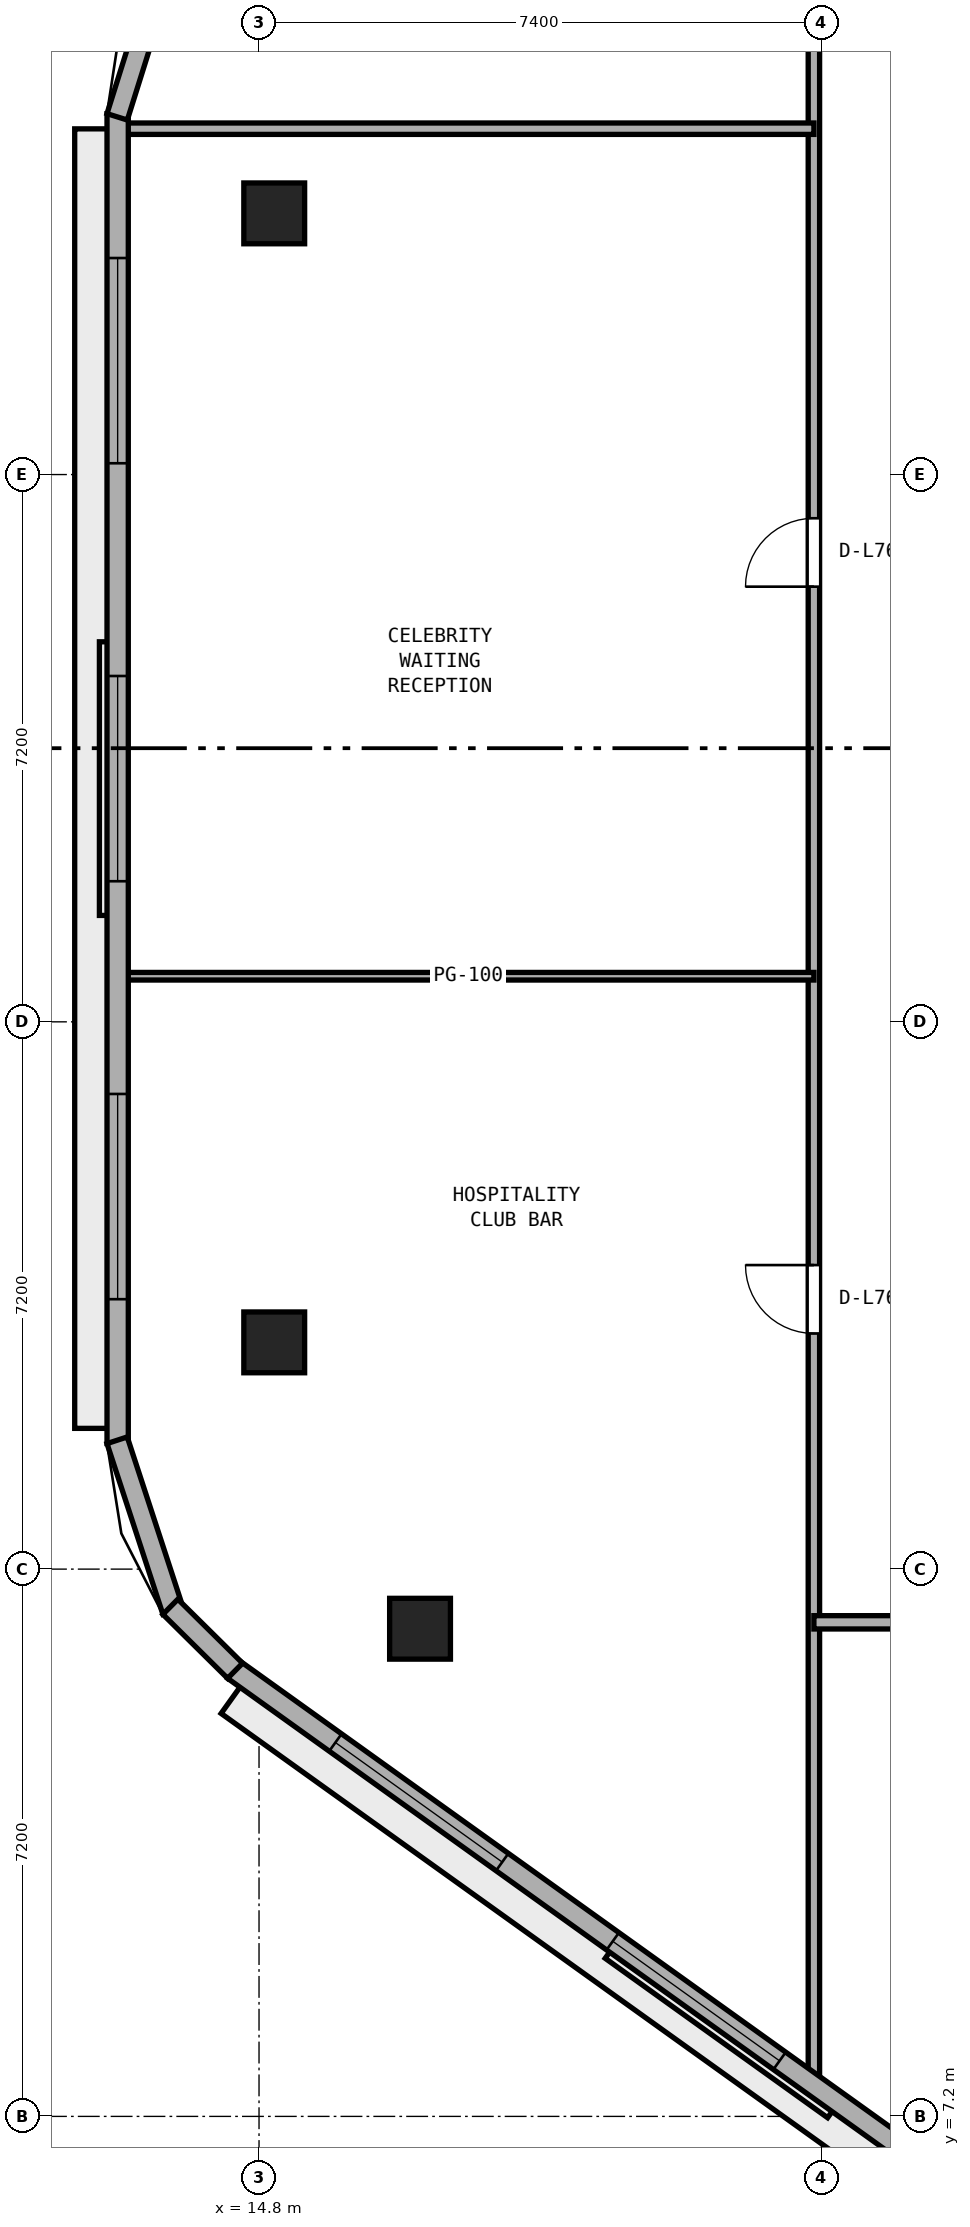
"""IFC4 building model, lengths in metres.
Left out: names, types, materials, properties, quantities, classifications, styles, units other than length and angle.
Written with IfcOpenShell. Run it as: python <this file> out.ifc"""

import sys

from ifc_helpers import new_model, si_unit, direction, frame, frame_2d, origin, origin_2d, place, context, subcontext, project, spatial, rectangle, extrude, element, fill, save


model = new_model("IFC4")
c1 = context("Model", 3, precision=1e-05, world=origin(), true_north=direction((0.0, 1.0)))
c2 = subcontext(c1, "Body", "Model", "MODEL_VIEW")
j1 = project(units=[si_unit("LENGTHUNIT", "METRE"), si_unit("PLANEANGLEUNIT", "RADIAN")], contexts=[c1])
p1 = place(None, origin())
s1 = spatial("IfcSite", under=j1, at=p1, CompositionType="ELEMENT")
p2 = place(p1, origin())
s2 = spatial("IfcBuilding", under=s1, at=p2, CompositionType="ELEMENT")
p3 = place(p2, frame((0.0, 0.0, 297.2)))
s3 = spatial("IfcBuildingStorey", under=s2, at=p3, CompositionType="ELEMENT", Elevation=297.2)
for number, where, z_axis, x_axis in (
    (1, (15.0, 32.236, 0.0), (0.0, 0.0, 1.0), (1.0, 0.0, 0.0)),
    (2, (15.0, 17.383, 0.0), (0.0, 0.0, 1.0), (1.0, 0.0, 0.0)),
    (3, (16.918, 13.616, 0.0), (0.0, 0.0, 1.0), (1.0, 0.0, 0.0)),
):
    element("IfcColumn", number, at=place(p3, frame(where, z_axis=z_axis, x_axis=x_axis)), inside=s3, PredefinedType="COLUMN", context=c2, shape_type="SweptSolid", body=[
        extrude(rectangle(XDim=0.8, YDim=0.8, at=origin_2d()), origin(), (0.0, 0.0, 1.0), 3.8),
    ])
p4 = place(p3, frame((22.1, 7.575, 0.0), z_axis=(0.0, 0.0, 1.0), x_axis=(0.0, 1.0, 0.0)))
e4 = element("IfcWall", 4, at=p4, inside=s3, PredefinedType="PARTITIONING", context=c2, shape_type="SweptSolid", body=[
    extrude(rectangle(XDim=29.125, YDim=0.15, at=frame_2d((14.562, 0.0))), origin(), (0.0, 0.0, 1.0), 3.54),
])
p5 = place(p4, frame((9.925, 0.0, 0.0)))
e5 = element("IfcOpeningElement", 5, at=p5, cuts=e4, PredefinedType="OPENING", context=c2, shape_type="SweptSolid", body=[
    extrude(rectangle(XDim=0.9, YDim=2.1, at=frame_2d((0.45, 1.05))), frame((0.0, 0.085, 0.0), z_axis=(0.0, -1.0, 0.0), x_axis=(1.0, 0.0, 0.0)), (0.0, 0.0, 1.0), 0.17),
])
p6 = place(p4, frame((19.75, 0.0, 0.0)))
e6 = element("IfcOpeningElement", 6, at=p6, cuts=e4, PredefinedType="OPENING", context=c2, shape_type="SweptSolid", body=[
    extrude(rectangle(XDim=0.9, YDim=2.1, at=frame_2d((0.45, 1.05))), frame((0.0, 0.085, 0.0), z_axis=(0.0, -1.0, 0.0), x_axis=(1.0, 0.0, 0.0)), (0.0, 0.0, 1.0), 0.17),
])
p7 = place(p3, frame((22.1, 13.7, 0.0), z_axis=(0.0, 0.0, 1.0), x_axis=(1.0, 0.0, 0.0)))
e7 = element("IfcWall", 7, at=p7, inside=s3, PredefinedType="PARTITIONING", context=c2, shape_type="SweptSolid", body=[
    extrude(rectangle(XDim=26.5, YDim=0.175, at=frame_2d((13.25, 0.0))), origin(), (0.0, 0.0, 1.0), 3.54),
])
p8 = place(p7, frame((7.12, 0.0, 0.0)))
e8 = element("IfcOpeningElement", 8, at=p8, cuts=e7, PredefinedType="OPENING", context=c2, shape_type="SweptSolid", body=[
    extrude(rectangle(XDim=0.9, YDim=2.1, at=frame_2d((0.45, 1.05))), frame((0.0, 0.097, 0.0), z_axis=(0.0, -1.0, 0.0), x_axis=(1.0, 0.0, 0.0)), (0.0, 0.0, 1.0), 0.195),
])
p9 = place(p7, frame((20.13, 0.0, 0.0)))
e9 = element("IfcOpeningElement", 9, at=p9, cuts=e7, PredefinedType="OPENING", context=c2, shape_type="SweptSolid", body=[
    extrude(rectangle(XDim=0.9, YDim=2.1, at=frame_2d((0.45, 1.05))), frame((0.0, 0.097, 0.0), z_axis=(0.0, -1.0, 0.0), x_axis=(1.0, 0.0, 0.0)), (0.0, 0.0, 1.0), 0.195),
])
p10 = place(p3, frame((13.005, 22.2, 0.0), z_axis=(0.0, 0.0, 1.0), x_axis=(1.0, 0.0, 0.0)))
e10 = element("IfcWall", 10, at=p10, inside=s3, PredefinedType="PARTITIONING", context=c2, shape_type="SweptSolid", body=[
    extrude(rectangle(XDim=9.095, YDim=0.1, at=frame_2d((4.548, 0.0))), origin(), (0.0, 0.0, 1.0), 3.54),
])
p11 = place(p3, frame((13.005, 33.35, 0.0), z_axis=(0.0, 0.0, 1.0), x_axis=(1.0, 0.0, 0.0)))
e11 = element("IfcWall", 11, at=p11, inside=s3, PredefinedType="PARTITIONING", context=c2, shape_type="SweptSolid", body=[
    extrude(rectangle(XDim=9.095, YDim=0.15, at=frame_2d((4.548, 0.0))), origin(), (0.0, 0.0, 1.0), 3.54),
])
p12 = place(p3, frame((12.94, 33.548, 0.0), z_axis=(0.0, 0.0, 1.0), x_axis=(0.0, -1.0, 0.0)))
e12 = element("IfcWall", 12, at=p12, inside=s3, PredefinedType="STANDARD", context=c2, shape_type="SweptSolid", body=[
    extrude(rectangle(XDim=17.496, YDim=0.28, at=frame_2d((8.748, 0.0))), origin(), (0.0, 0.0, 1.0), 3.54),
])
p13 = place(p12, frame((1.899, 0.0, 0.9)))
e13 = element("IfcOpeningElement", 13, at=p13, cuts=e12, PredefinedType="OPENING", context=c2, shape_type="SweptSolid", body=[
    extrude(rectangle(XDim=2.7, YDim=1.75, at=frame_2d((1.35, 0.875))), frame((0.0, 0.15, 0.0), z_axis=(0.0, -1.0, 0.0), x_axis=(1.0, 0.0, 0.0)), (0.0, 0.0, 1.0), 0.3),
])
p14 = place(p12, frame((7.398, 0.0, 0.9)))
e14 = element("IfcOpeningElement", 14, at=p14, cuts=e12, PredefinedType="OPENING", context=c2, shape_type="SweptSolid", body=[
    extrude(rectangle(XDim=2.7, YDim=1.75, at=frame_2d((1.35, 0.875))), frame((0.0, 0.15, 0.0), z_axis=(0.0, -1.0, 0.0), x_axis=(1.0, 0.0, 0.0)), (0.0, 0.0, 1.0), 0.3),
])
p15 = place(p12, frame((12.897, 0.0, 0.9)))
e15 = element("IfcOpeningElement", 15, at=p15, cuts=e12, PredefinedType="OPENING", context=c2, shape_type="SweptSolid", body=[
    extrude(rectangle(XDim=2.7, YDim=1.75, at=frame_2d((1.35, 0.875))), frame((0.0, 0.15, 0.0), z_axis=(0.0, -1.0, 0.0), x_axis=(1.0, 0.0, 0.0)), (0.0, 0.0, 1.0), 0.3),
])
p16 = place(p3, frame((14.468, 13.077, 0.0), z_axis=(0.0, 0.0, 1.0), x_axis=(0.812809888039, -0.582529042972, 0.0)))
e16 = element("IfcWall", 16, at=p16, inside=s3, PredefinedType="STANDARD", context=c2, shape_type="SweptSolid", body=[
    extrude(rectangle(XDim=15.968, YDim=0.28, at=frame_2d((7.984, 0.0))), origin(), (0.0, 0.0, 1.0), 3.54),
])
p17 = place(p16, frame((1.645, 0.0, 0.9)))
e17 = element("IfcOpeningElement", 17, at=p17, cuts=e16, PredefinedType="OPENING", context=c2, shape_type="SweptSolid", body=[
    extrude(rectangle(XDim=2.7, YDim=1.75, at=frame_2d((1.35, 0.875))), frame((0.0, 0.15, 0.0), z_axis=(0.0, -1.0, 0.0), x_axis=(1.0, 0.0, 0.0)), (0.0, 0.0, 1.0), 0.3),
])
p18 = place(p16, frame((6.134, 0.0, 0.9)))
e18 = element("IfcOpeningElement", 18, at=p18, cuts=e16, PredefinedType="OPENING", context=c2, shape_type="SweptSolid", body=[
    extrude(rectangle(XDim=2.7, YDim=1.75, at=frame_2d((1.35, 0.875))), frame((0.0, 0.15, 0.0), z_axis=(0.0, -1.0, 0.0), x_axis=(1.0, 0.0, 0.0)), (0.0, 0.0, 1.0), 0.3),
])
p19 = place(p16, frame((11.623, 0.0, 0.9)))
e19 = element("IfcOpeningElement", 19, at=p19, cuts=e16, PredefinedType="OPENING", context=c2, shape_type="SweptSolid", body=[
    extrude(rectangle(XDim=2.7, YDim=1.75, at=frame_2d((1.35, 0.875))), frame((0.0, 0.15, 0.0), z_axis=(0.0, -1.0, 0.0), x_axis=(1.0, 0.0, 0.0)), (0.0, 0.0, 1.0), 0.3),
])
p20 = place(p3, frame((13.615, 35.677, 0.0), z_axis=(0.0, 0.0, 1.0), x_axis=(-0.299374552426, -0.954135670311, 0.0)))
e20 = element("IfcWall", 20, at=p20, inside=s3, PredefinedType="STANDARD", context=c2, shape_type="SweptSolid", body=[
    extrude(rectangle(XDim=2.275, YDim=0.28, at=frame_2d((1.138, 0.0))), origin(), (0.0, 0.0, 1.0), 3.54),
])
p21 = place(p3, frame((12.933, 16.095, 0.0), z_axis=(0.0, 0.0, 1.0), x_axis=(0.3110492363, -0.950393798695, 0.0)))
e21 = element("IfcWall", 21, at=p21, inside=s3, PredefinedType="STANDARD", context=c2, shape_type="SweptSolid", body=[
    extrude(rectangle(XDim=2.364, YDim=0.28, at=frame_2d((1.182, 0.0))), origin(), (0.0, 0.0, 1.0), 3.54),
])
p22 = place(p3, frame((13.634, 13.904, 0.0), z_axis=(0.0, 0.0, 1.0), x_axis=(0.710971221429, -0.703221104845, 0.0)))
e22 = element("IfcWall", 22, at=p22, inside=s3, PredefinedType="STANDARD", context=c2, shape_type="SweptSolid", body=[
    extrude(rectangle(XDim=1.197, YDim=0.28, at=frame_2d((0.599, 0.0))), origin(), (0.0, 0.0, 1.0), 3.54),
])
p23 = place(p5, origin())
e23 = element("IfcDoor", 23, at=p23, inside=s3, OperationType="SINGLE_SWING_RIGHT", PredefinedType="DOOR", context=c2, shape_type="SweptSolid", body=[
    extrude(rectangle(XDim=0.9, YDim=2.1, at=frame_2d((0.45, 1.05))), frame((0.0, 0.025, 0.0), z_axis=(0.0, -1.0, 0.0), x_axis=(1.0, 0.0, 0.0)), (0.0, 0.0, 1.0), 0.05),
])
fill(e5, e23)
p24 = place(p6, origin())
e24 = element("IfcDoor", 24, at=p24, inside=s3, OperationType="SINGLE_SWING_LEFT", PredefinedType="DOOR", context=c2, shape_type="SweptSolid", body=[
    extrude(rectangle(XDim=0.9, YDim=2.1, at=frame_2d((0.45, 1.05))), frame((0.0, 0.025, 0.0), z_axis=(0.0, -1.0, 0.0), x_axis=(1.0, 0.0, 0.0)), (0.0, 0.0, 1.0), 0.05),
])
fill(e6, e24)
p25 = place(p13, origin())
e25 = element("IfcWindow", 25, at=p25, inside=s3, PartitioningType="SINGLE_PANEL", PredefinedType="WINDOW", context=c2, shape_type="SweptSolid", body=[
    extrude(rectangle(XDim=2.7, YDim=1.75, at=frame_2d((1.35, 0.875))), frame((0.0, 0.03, 0.0), z_axis=(0.0, -1.0, 0.0), x_axis=(1.0, 0.0, 0.0)), (0.0, 0.0, 1.0), 0.06),
])
fill(e13, e25)
p26 = place(p14, origin())
e26 = element("IfcWindow", 26, at=p26, inside=s3, PartitioningType="SINGLE_PANEL", PredefinedType="WINDOW", context=c2, shape_type="SweptSolid", body=[
    extrude(rectangle(XDim=2.7, YDim=1.75, at=frame_2d((1.35, 0.875))), frame((0.0, 0.03, 0.0), z_axis=(0.0, -1.0, 0.0), x_axis=(1.0, 0.0, 0.0)), (0.0, 0.0, 1.0), 0.06),
])
fill(e14, e26)
p27 = place(p15, origin())
e27 = element("IfcWindow", 27, at=p27, inside=s3, PartitioningType="SINGLE_PANEL", PredefinedType="WINDOW", context=c2, shape_type="SweptSolid", body=[
    extrude(rectangle(XDim=2.7, YDim=1.75, at=frame_2d((1.35, 0.875))), frame((0.0, 0.03, 0.0), z_axis=(0.0, -1.0, 0.0), x_axis=(1.0, 0.0, 0.0)), (0.0, 0.0, 1.0), 0.06),
])
fill(e15, e27)
p28 = place(p17, origin())
e28 = element("IfcWindow", 28, at=p28, inside=s3, PartitioningType="SINGLE_PANEL", PredefinedType="WINDOW", context=c2, shape_type="SweptSolid", body=[
    extrude(rectangle(XDim=2.7, YDim=1.75, at=frame_2d((1.35, 0.875))), frame((0.0, 0.03, 0.0), z_axis=(0.0, -1.0, 0.0), x_axis=(1.0, 0.0, 0.0)), (0.0, 0.0, 1.0), 0.06),
])
fill(e17, e28)
p29 = place(p18, origin())
e29 = element("IfcWindow", 29, at=p29, inside=s3, PartitioningType="SINGLE_PANEL", PredefinedType="WINDOW", context=c2, shape_type="SweptSolid", body=[
    extrude(rectangle(XDim=2.7, YDim=1.75, at=frame_2d((1.35, 0.875))), frame((0.0, 0.03, 0.0), z_axis=(0.0, -1.0, 0.0), x_axis=(1.0, 0.0, 0.0)), (0.0, 0.0, 1.0), 0.06),
])
fill(e18, e29)
save(model, sys.argv[1])
